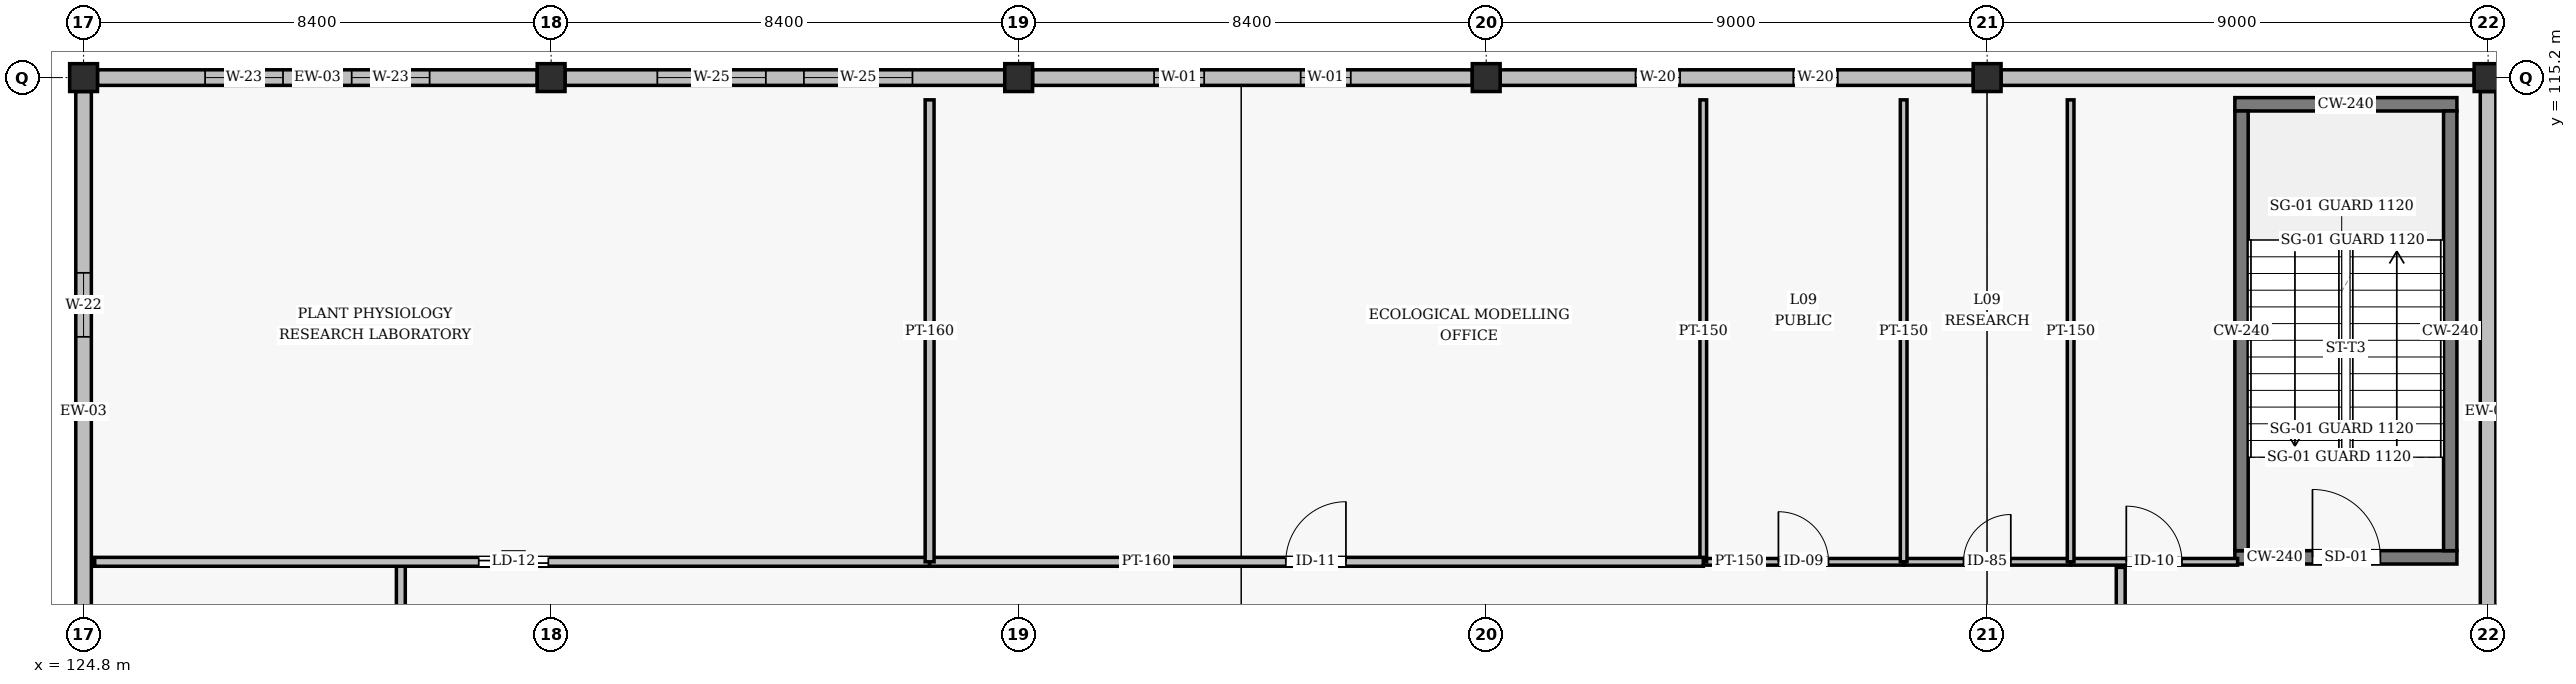
"""IFC4 building model, lengths in metres.
Left out: names, types, materials, properties, quantities, classifications, styles, units other than length and angle.
Written with IfcOpenShell. Run it as: python <this file> out.ifc"""

import sys

from ifc_helpers import new_model, si_unit, direction, frame, frame_2d, origin, origin_2d, place, context, subcontext, project, spatial, rectangle, hollow_rectangle, extrude, element, fill, save


model = new_model("IFC4")
c1 = context("Model", 3, precision=1e-05, world=origin(), true_north=direction((0.0, 1.0)))
c2 = subcontext(c1, "Body", "Model", "MODEL_VIEW")
j1 = project(units=[si_unit("LENGTHUNIT", "METRE"), si_unit("PLANEANGLEUNIT", "RADIAN")], contexts=[c1])
p1 = place(None, origin())
s1 = spatial("IfcSite", under=j1, at=p1, CompositionType="ELEMENT")
p2 = place(p1, origin())
s2 = spatial("IfcBuilding", under=s1, at=p2, CompositionType="ELEMENT")
p3 = place(p2, frame((0.0, 0.0, 35.4)))
s3 = spatial("IfcBuildingStorey", under=s2, at=p3, CompositionType="ELEMENT", Elevation=35.4)
for number, where, z_axis, x_axis in (
    (1, (124.8, 115.2, 0.0), (0.0, 0.0, 1.0), (1.0, 0.0, 0.0)),
    (2, (133.2, 115.2, 0.0), (0.0, 0.0, 1.0), (1.0, 0.0, 0.0)),
    (3, (141.6, 115.2, 0.0), (0.0, 0.0, 1.0), (1.0, 0.0, 0.0)),
    (4, (150.0, 115.2, 0.0), (0.0, 0.0, 1.0), (1.0, 0.0, 0.0)),
    (5, (159.0, 115.2, 0.0), (0.0, 0.0, 1.0), (1.0, 0.0, 0.0)),
    (6, (168.0, 115.2, 0.0), (0.0, 0.0, 1.0), (1.0, 0.0, 0.0)),
):
    element("IfcColumn", number, at=place(p3, frame(where, z_axis=z_axis, x_axis=x_axis)), inside=s3, PredefinedType="COLUMN", context=c2, shape_type="SweptSolid", body=[
        extrude(hollow_rectangle(XDim=0.5, YDim=0.5, WallThickness=0.02, InnerFilletRadius=0.02, OuterFilletRadius=0.04, at=origin_2d()), origin(), (0.0, 0.0, 1.0), 4.2),
    ])
p4 = place(p3, frame((168.0, 103.45, 0.0), z_axis=(0.0, 0.0, 1.0), x_axis=(0.0, 1.0, 0.0)))
e7 = element("IfcWall", 7, at=p4, inside=s3, PredefinedType="SOLIDWALL", context=c2, shape_type="SweptSolid", body=[
    extrude(rectangle(XDim=11.5, YDim=0.28, at=frame_2d((5.75, 0.0))), origin(), (0.0, 0.0, 1.0), 3.156),
])
p5 = place(p3, frame((167.75, 115.2, 0.0), z_axis=(0.0, 0.0, 1.0), x_axis=(-1.0, 0.0, 0.0)))
e8 = element("IfcWall", 8, at=p5, inside=s3, PredefinedType="SOLIDWALL", context=c2, shape_type="SweptSolid", body=[
    extrude(rectangle(XDim=8.5, YDim=0.28, at=frame_2d((4.25, 0.0))), origin(), (0.0, 0.0, 1.0), 3.156),
])
p6 = place(p3, frame((158.75, 115.2, 0.0), z_axis=(0.0, 0.0, 1.0), x_axis=(-1.0, 0.0, 0.0)))
e9 = element("IfcWall", 9, at=p6, inside=s3, PredefinedType="SOLIDWALL", context=c2, shape_type="SweptSolid", body=[
    extrude(rectangle(XDim=8.5, YDim=0.28, at=frame_2d((4.25, 0.0))), origin(), (0.0, 0.0, 1.0), 3.156),
])
p7 = place(p6, frame((2.433, 0.0, 1.25)))
e10 = element("IfcOpeningElement", 10, at=p7, cuts=e9, PredefinedType="OPENING", context=c2, shape_type="SweptSolid", body=[
    extrude(rectangle(XDim=0.8, YDim=1.35, at=frame_2d((0.4, 0.675))), frame((0.0, 0.15, 0.0), z_axis=(0.0, -1.0, 0.0), x_axis=(1.0, 0.0, 0.0)), (0.0, 0.0, 1.0), 0.3),
])
p8 = place(p6, frame((5.267, 0.0, 1.25)))
e11 = element("IfcOpeningElement", 11, at=p8, cuts=e9, PredefinedType="OPENING", context=c2, shape_type="SweptSolid", body=[
    extrude(rectangle(XDim=0.8, YDim=1.35, at=frame_2d((0.4, 0.675))), frame((0.0, 0.15, 0.0), z_axis=(0.0, -1.0, 0.0), x_axis=(1.0, 0.0, 0.0)), (0.0, 0.0, 1.0), 0.3),
])
p9 = place(p3, frame((149.75, 115.2, 0.0), z_axis=(0.0, 0.0, 1.0), x_axis=(-1.0, 0.0, 0.0)))
e12 = element("IfcWall", 12, at=p9, inside=s3, PredefinedType="SOLIDWALL", context=c2, shape_type="SweptSolid", body=[
    extrude(rectangle(XDim=7.9, YDim=0.28, at=frame_2d((3.95, 0.0))), origin(), (0.0, 0.0, 1.0), 3.448),
])
p10 = place(p9, frame((2.183, 0.0, 0.95)))
e13 = element("IfcOpeningElement", 13, at=p10, cuts=e12, PredefinedType="OPENING", context=c2, shape_type="SweptSolid", body=[
    extrude(rectangle(XDim=0.9, YDim=1.8, at=frame_2d((0.45, 0.9))), frame((0.0, 0.15, 0.0), z_axis=(0.0, -1.0, 0.0), x_axis=(1.0, 0.0, 0.0)), (0.0, 0.0, 1.0), 0.3),
])
p11 = place(p9, frame((4.817, 0.0, 0.95)))
e14 = element("IfcOpeningElement", 14, at=p11, cuts=e12, PredefinedType="OPENING", context=c2, shape_type="SweptSolid", body=[
    extrude(rectangle(XDim=0.9, YDim=1.8, at=frame_2d((0.45, 0.9))), frame((0.0, 0.15, 0.0), z_axis=(0.0, -1.0, 0.0), x_axis=(1.0, 0.0, 0.0)), (0.0, 0.0, 1.0), 0.3),
])
p12 = place(p3, frame((141.35, 115.2, 0.0), z_axis=(0.0, 0.0, 1.0), x_axis=(-1.0, 0.0, 0.0)))
e15 = element("IfcWall", 15, at=p12, inside=s3, PredefinedType="SOLIDWALL", context=c2, shape_type="SweptSolid", body=[
    extrude(rectangle(XDim=7.9, YDim=0.28, at=frame_2d((3.95, 0.0))), origin(), (0.0, 0.0, 1.0), 3.448),
])
p13 = place(p12, frame((1.658, 0.0, 0.8)))
e16 = element("IfcOpeningElement", 16, at=p13, cuts=e15, PredefinedType="OPENING", context=c2, shape_type="SweptSolid", body=[
    extrude(rectangle(XDim=1.95, YDim=2.15, at=frame_2d((0.975, 1.075))), frame((0.0, 0.15, 0.0), z_axis=(0.0, -1.0, 0.0), x_axis=(1.0, 0.0, 0.0)), (0.0, 0.0, 1.0), 0.3),
])
p14 = place(p12, frame((4.292, 0.0, 0.8)))
e17 = element("IfcOpeningElement", 17, at=p14, cuts=e15, PredefinedType="OPENING", context=c2, shape_type="SweptSolid", body=[
    extrude(rectangle(XDim=1.95, YDim=2.15, at=frame_2d((0.975, 1.075))), frame((0.0, 0.15, 0.0), z_axis=(0.0, -1.0, 0.0), x_axis=(1.0, 0.0, 0.0)), (0.0, 0.0, 1.0), 0.3),
])
p15 = place(p3, frame((132.95, 115.2, 0.0), z_axis=(0.0, 0.0, 1.0), x_axis=(-1.0, 0.0, 0.0)))
e18 = element("IfcWall", 18, at=p15, inside=s3, PredefinedType="SOLIDWALL", context=c2, shape_type="SweptSolid", body=[
    extrude(rectangle(XDim=7.9, YDim=0.28, at=frame_2d((3.95, 0.0))), origin(), (0.0, 0.0, 1.0), 3.448),
])
p16 = place(p15, frame((1.933, 0.0, 0.85)))
e19 = element("IfcOpeningElement", 19, at=p16, cuts=e18, PredefinedType="OPENING", context=c2, shape_type="SweptSolid", body=[
    extrude(rectangle(XDim=1.4, YDim=2.05, at=frame_2d((0.7, 1.025))), frame((0.0, 0.15, 0.0), z_axis=(0.0, -1.0, 0.0), x_axis=(1.0, 0.0, 0.0)), (0.0, 0.0, 1.0), 0.3),
])
p17 = place(p15, frame((4.567, 0.0, 0.85)))
e20 = element("IfcOpeningElement", 20, at=p17, cuts=e18, PredefinedType="OPENING", context=c2, shape_type="SweptSolid", body=[
    extrude(rectangle(XDim=1.4, YDim=2.05, at=frame_2d((0.7, 1.025))), frame((0.0, 0.15, 0.0), z_axis=(0.0, -1.0, 0.0), x_axis=(1.0, 0.0, 0.0)), (0.0, 0.0, 1.0), 0.3),
])
p18 = place(p3, frame((124.8, 114.95, 0.0), z_axis=(0.0, 0.0, 1.0), x_axis=(0.0, -1.0, 0.0)))
e21 = element("IfcWall", 21, at=p18, inside=s3, PredefinedType="SOLIDWALL", context=c2, shape_type="SweptSolid", body=[
    extrude(rectangle(XDim=11.5, YDim=0.28, at=frame_2d((5.75, 0.0))), origin(), (0.0, 0.0, 1.0), 3.156),
])
p19 = place(p18, frame((3.258, 0.0, 0.9)))
e22 = element("IfcOpeningElement", 22, at=p19, cuts=e21, PredefinedType="OPENING", context=c2, shape_type="SweptSolid", body=[
    extrude(rectangle(XDim=1.15, YDim=1.96, at=frame_2d((0.575, 0.98))), frame((0.0, 0.15, 0.0), z_axis=(0.0, -1.0, 0.0), x_axis=(1.0, 0.0, 0.0)), (0.0, 0.0, 1.0), 0.3),
])
p20 = place(p3, frame((163.45, 106.58, 0.0), z_axis=(0.0, 0.0, 1.0), x_axis=(1.0, 0.0, 0.0)))
e23 = element("IfcWall", 23, at=p20, inside=s3, PredefinedType="SHEAR", context=c2, shape_type="SweptSolid", body=[
    extrude(rectangle(XDim=3.99, YDim=0.24, at=frame_2d((1.995, 0.0))), origin(), (0.0, 0.0, 1.0), 3.948),
])
p21 = place(p20, frame((1.395, 0.0, 0.0)))
e24 = element("IfcOpeningElement", 24, at=p21, cuts=e23, PredefinedType="OPENING", context=c2, shape_type="SweptSolid", body=[
    extrude(rectangle(XDim=1.22, YDim=2.18, at=frame_2d((0.61, 1.09))), frame((0.0, 0.13, 0.0), z_axis=(0.0, -1.0, 0.0), x_axis=(1.0, 0.0, 0.0)), (0.0, 0.0, 1.0), 0.26),
])
p22 = place(p3, frame((163.45, 114.72, 0.0), z_axis=(0.0, 0.0, 1.0), x_axis=(1.0, 0.0, 0.0)))
e25 = element("IfcWall", 25, at=p22, inside=s3, PredefinedType="SHEAR", context=c2, shape_type="SweptSolid", body=[
    extrude(rectangle(XDim=3.99, YDim=0.24, at=frame_2d((1.995, 0.0))), origin(), (0.0, 0.0, 1.0), 3.948),
])
for number, where, z_axis, x_axis in (
    (26, (163.57, 106.7, 0.0), (0.0, 0.0, 1.0), (0.0, 1.0, 0.0)),
    (27, (167.32, 106.7, 0.0), (0.0, 0.0, 1.0), (0.0, 1.0, 0.0)),
):
    element("IfcWall", number, at=place(p3, frame(where, z_axis=z_axis, x_axis=x_axis)), inside=s3, PredefinedType="SHEAR", context=c2, shape_type="SweptSolid", body=[
        extrude(rectangle(XDim=7.9, YDim=0.24, at=frame_2d((3.95, 0.0))), origin(), (0.0, 0.0, 1.0), 3.948),
    ])
p23 = place(p3, frame((153.9, 106.5, 0.0), z_axis=(0.0, 0.0, 1.0), x_axis=(1.0, 0.0, 0.0)))
e28 = element("IfcWall", 28, at=p23, inside=s3, PredefinedType="PARTITIONING", context=c2, shape_type="SweptSolid", body=[
    extrude(rectangle(XDim=3.6, YDim=0.12, at=frame_2d((1.8, 0.0))), origin(), (0.0, 0.0, 1.0), 3.948),
])
p24 = place(p23, frame((1.35, 0.0, 0.0)))
e29 = element("IfcOpeningElement", 29, at=p24, cuts=e28, PredefinedType="OPENING", context=c2, shape_type="SweptSolid", body=[
    extrude(rectangle(XDim=0.9, YDim=2.1, at=frame_2d((0.45, 1.05))), frame((0.0, 0.07, 0.0), z_axis=(0.0, -1.0, 0.0), x_axis=(1.0, 0.0, 0.0)), (0.0, 0.0, 1.0), 0.14),
])
p25 = place(p3, frame((157.5, 106.5, 0.0), z_axis=(0.0, 0.0, 1.0), x_axis=(1.0, 0.0, 0.0)))
e30 = element("IfcWall", 30, at=p25, inside=s3, PredefinedType="PARTITIONING", context=c2, shape_type="SweptSolid", body=[
    extrude(rectangle(XDim=3.0, YDim=0.12, at=frame_2d((1.5, 0.0))), origin(), (0.0, 0.0, 1.0), 3.248),
])
p26 = place(p25, frame((1.075, 0.0, 0.0)))
e31 = element("IfcOpeningElement", 31, at=p26, cuts=e30, PredefinedType="OPENING", context=c2, shape_type="SweptSolid", body=[
    extrude(rectangle(XDim=0.85, YDim=2.1, at=frame_2d((0.425, 1.05))), frame((0.0, 0.07, 0.0), z_axis=(0.0, -1.0, 0.0), x_axis=(1.0, 0.0, 0.0)), (0.0, 0.0, 1.0), 0.14),
])
p27 = place(p3, frame((160.5, 106.5, 0.0), z_axis=(0.0, 0.0, 1.0), x_axis=(1.0, 0.0, 0.0)))
e32 = element("IfcWall", 32, at=p27, inside=s3, PredefinedType="PARTITIONING", context=c2, shape_type="SweptSolid", body=[
    extrude(rectangle(XDim=3.0, YDim=0.12, at=frame_2d((1.5, 0.0))), origin(), (0.0, 0.0, 1.0), 3.948),
])
p28 = place(p27, frame((1.0, 0.0, 0.0)))
e33 = element("IfcOpeningElement", 33, at=p28, cuts=e32, PredefinedType="OPENING", context=c2, shape_type="SweptSolid", body=[
    extrude(rectangle(XDim=1.0, YDim=2.1, at=frame_2d((0.5, 1.05))), frame((0.0, 0.07, 0.0), z_axis=(0.0, -1.0, 0.0), x_axis=(1.0, 0.0, 0.0)), (0.0, 0.0, 1.0), 0.14),
])
for number, where, z_axis, x_axis in (
    (34, (153.9, 106.5, 0.0), (0.0, 0.0, 1.0), (0.0, 1.0, 0.0)),
    (35, (157.5, 106.5, 0.0), (0.0, 0.0, 1.0), (0.0, 1.0, 0.0)),
):
    element("IfcWall", number, at=place(p3, frame(where, z_axis=z_axis, x_axis=x_axis)), inside=s3, PredefinedType="PARTITIONING", context=c2, shape_type="SweptSolid", body=[
        extrude(rectangle(XDim=8.3, YDim=0.12, at=frame_2d((4.15, 0.0))), origin(), (0.0, 0.0, 1.0), 3.552),
    ])
p29 = place(p3, frame((160.5, 106.5, 0.0), z_axis=(0.0, 0.0, 1.0), x_axis=(0.0, 1.0, 0.0)))
e36 = element("IfcWall", 36, at=p29, inside=s3, PredefinedType="PARTITIONING", context=c2, shape_type="SweptSolid", body=[
    extrude(rectangle(XDim=8.3, YDim=0.12, at=frame_2d((4.15, 0.0))), origin(), (0.0, 0.0, 1.0), 3.948),
])
p30 = place(p3, frame((161.4, 92.3, 0.0), z_axis=(0.0, 0.0, 1.0), x_axis=(0.0, 1.0, 0.0)))
e37 = element("IfcWall", 37, at=p30, inside=s3, PredefinedType="PARTITIONING", context=c2, shape_type="SweptSolid", body=[
    extrude(rectangle(XDim=14.1, YDim=0.16, at=frame_2d((7.05, 0.0))), origin(), (0.0, 0.0, 1.0), 3.348),
])
p31 = place(p30, frame((6.5, 0.0, 0.0)))
e38 = element("IfcOpeningElement", 38, at=p31, cuts=e37, PredefinedType="OPENING", context=c2, shape_type="SweptSolid", body=[
    extrude(rectangle(XDim=1.08, YDim=2.08, at=frame_2d((0.54, 1.04))), frame((0.0, 0.09, 0.0), z_axis=(0.0, -1.0, 0.0), x_axis=(1.0, 0.0, 0.0)), (0.0, 0.0, 1.0), 0.18),
])
p32 = place(p3, frame((130.5, 92.3, 0.0), z_axis=(0.0, 0.0, 1.0), x_axis=(0.0, 1.0, 0.0)))
e39 = element("IfcWall", 39, at=p32, inside=s3, PredefinedType="PARTITIONING", context=c2, shape_type="SweptSolid", body=[
    extrude(rectangle(XDim=14.2, YDim=0.16, at=frame_2d((7.1, 0.0))), origin(), (0.0, 0.0, 1.0), 3.452),
])
p33 = place(p32, frame((6.55, 0.0, 0.0)))
e40 = element("IfcOpeningElement", 40, at=p33, cuts=e39, PredefinedType="OPENING", context=c2, shape_type="SweptSolid", body=[
    extrude(rectangle(XDim=1.14, YDim=2.12, at=frame_2d((0.57, 1.06))), frame((0.0, 0.09, 0.0), z_axis=(0.0, -1.0, 0.0), x_axis=(1.0, 0.0, 0.0)), (0.0, 0.0, 1.0), 0.18),
])
p34 = place(p3, frame((125.0, 106.5, 0.0), z_axis=(0.0, 0.0, 1.0), x_axis=(1.0, 0.0, 0.0)))
e41 = element("IfcWall", 41, at=p34, inside=s3, PredefinedType="PARTITIONING", context=c2, shape_type="SweptSolid", body=[
    extrude(rectangle(XDim=15.0, YDim=0.16, at=frame_2d((7.5, 0.0))), origin(), (0.0, 0.0, 1.0), 3.248),
])
p35 = place(p34, frame((6.9, 0.0, 0.0)))
e42 = element("IfcOpeningElement", 42, at=p35, cuts=e41, PredefinedType="OPENING", context=c2, shape_type="SweptSolid", body=[
    extrude(rectangle(XDim=1.25, YDim=2.12, at=frame_2d((0.625, 1.06))), frame((0.0, 0.09, 0.0), z_axis=(0.0, -1.0, 0.0), x_axis=(1.0, 0.0, 0.0)), (0.0, 0.0, 1.0), 0.18),
])
p36 = place(p3, frame((140.0, 106.5, 0.0), z_axis=(0.0, 0.0, 1.0), x_axis=(1.0, 0.0, 0.0)))
e43 = element("IfcWall", 43, at=p36, inside=s3, PredefinedType="PARTITIONING", context=c2, shape_type="SweptSolid", body=[
    extrude(rectangle(XDim=13.9, YDim=0.16, at=frame_2d((6.95, 0.0))), origin(), (0.0, 0.0, 1.0), 3.248),
])
p37 = place(p36, frame((6.4, 0.0, 0.0)))
e44 = element("IfcOpeningElement", 44, at=p37, cuts=e43, PredefinedType="OPENING", context=c2, shape_type="SweptSolid", body=[
    extrude(rectangle(XDim=1.08, YDim=2.08, at=frame_2d((0.54, 1.04))), frame((0.0, 0.09, 0.0), z_axis=(0.0, -1.0, 0.0), x_axis=(1.0, 0.0, 0.0)), (0.0, 0.0, 1.0), 0.18),
])
p38 = place(p3, frame((140.0, 106.5, 0.0), z_axis=(0.0, 0.0, 1.0), x_axis=(0.0, 1.0, 0.0)))
e45 = element("IfcWall", 45, at=p38, inside=s3, PredefinedType="PARTITIONING", context=c2, shape_type="SweptSolid", body=[
    extrude(rectangle(XDim=8.3, YDim=0.16, at=frame_2d((4.15, 0.0))), origin(), (0.0, 0.0, 1.0), 3.602),
])
p39 = place(p7, origin())
e46 = element("IfcWindow", 46, at=p39, inside=s3, PartitioningType="SINGLE_PANEL", PredefinedType="WINDOW", context=c2, shape_type="SweptSolid", body=[
    extrude(rectangle(XDim=0.8, YDim=1.35, at=frame_2d((0.4, 0.675))), frame((0.0, 0.03, 0.0), z_axis=(0.0, -1.0, 0.0), x_axis=(1.0, 0.0, 0.0)), (0.0, 0.0, 1.0), 0.06),
])
fill(e10, e46)
p40 = place(p8, origin())
e47 = element("IfcWindow", 47, at=p40, inside=s3, PartitioningType="SINGLE_PANEL", PredefinedType="WINDOW", context=c2, shape_type="SweptSolid", body=[
    extrude(rectangle(XDim=0.8, YDim=1.35, at=frame_2d((0.4, 0.675))), frame((0.0, 0.03, 0.0), z_axis=(0.0, -1.0, 0.0), x_axis=(1.0, 0.0, 0.0)), (0.0, 0.0, 1.0), 0.06),
])
fill(e11, e47)
p41 = place(p10, origin())
e48 = element("IfcWindow", 48, at=p41, inside=s3, PartitioningType="SINGLE_PANEL", PredefinedType="WINDOW", context=c2, shape_type="SweptSolid", body=[
    extrude(rectangle(XDim=0.9, YDim=1.8, at=frame_2d((0.45, 0.9))), frame((0.0, 0.03, 0.0), z_axis=(0.0, -1.0, 0.0), x_axis=(1.0, 0.0, 0.0)), (0.0, 0.0, 1.0), 0.06),
])
fill(e13, e48)
p42 = place(p11, origin())
e49 = element("IfcWindow", 49, at=p42, inside=s3, PartitioningType="SINGLE_PANEL", PredefinedType="WINDOW", context=c2, shape_type="SweptSolid", body=[
    extrude(rectangle(XDim=0.9, YDim=1.8, at=frame_2d((0.45, 0.9))), frame((0.0, 0.03, 0.0), z_axis=(0.0, -1.0, 0.0), x_axis=(1.0, 0.0, 0.0)), (0.0, 0.0, 1.0), 0.06),
])
fill(e14, e49)
p43 = place(p13, origin())
e50 = element("IfcWindow", 50, at=p43, inside=s3, PartitioningType="SINGLE_PANEL", PredefinedType="WINDOW", context=c2, shape_type="SweptSolid", body=[
    extrude(rectangle(XDim=1.95, YDim=2.15, at=frame_2d((0.975, 1.075))), frame((0.0, 0.03, 0.0), z_axis=(0.0, -1.0, 0.0), x_axis=(1.0, 0.0, 0.0)), (0.0, 0.0, 1.0), 0.06),
])
fill(e16, e50)
p44 = place(p14, origin())
e51 = element("IfcWindow", 51, at=p44, inside=s3, PartitioningType="SINGLE_PANEL", PredefinedType="WINDOW", context=c2, shape_type="SweptSolid", body=[
    extrude(rectangle(XDim=1.95, YDim=2.15, at=frame_2d((0.975, 1.075))), frame((0.0, 0.03, 0.0), z_axis=(0.0, -1.0, 0.0), x_axis=(1.0, 0.0, 0.0)), (0.0, 0.0, 1.0), 0.06),
])
fill(e17, e51)
p45 = place(p16, origin())
e52 = element("IfcWindow", 52, at=p45, inside=s3, PartitioningType="SINGLE_PANEL", PredefinedType="WINDOW", context=c2, shape_type="SweptSolid", body=[
    extrude(rectangle(XDim=1.4, YDim=2.05, at=frame_2d((0.7, 1.025))), frame((0.0, 0.03, 0.0), z_axis=(0.0, -1.0, 0.0), x_axis=(1.0, 0.0, 0.0)), (0.0, 0.0, 1.0), 0.06),
])
fill(e19, e52)
p46 = place(p17, origin())
e53 = element("IfcWindow", 53, at=p46, inside=s3, PartitioningType="SINGLE_PANEL", PredefinedType="WINDOW", context=c2, shape_type="SweptSolid", body=[
    extrude(rectangle(XDim=1.4, YDim=2.05, at=frame_2d((0.7, 1.025))), frame((0.0, 0.03, 0.0), z_axis=(0.0, -1.0, 0.0), x_axis=(1.0, 0.0, 0.0)), (0.0, 0.0, 1.0), 0.06),
])
fill(e20, e53)
p47 = place(p19, origin())
e54 = element("IfcWindow", 54, at=p47, inside=s3, PartitioningType="SINGLE_PANEL", PredefinedType="WINDOW", context=c2, shape_type="SweptSolid", body=[
    extrude(rectangle(XDim=1.15, YDim=1.96, at=frame_2d((0.575, 0.98))), frame((0.0, 0.03, 0.0), z_axis=(0.0, -1.0, 0.0), x_axis=(1.0, 0.0, 0.0)), (0.0, 0.0, 1.0), 0.06),
])
fill(e22, e54)
p48 = place(p21, origin())
e55 = element("IfcDoor", 55, at=p48, inside=s3, OperationType="SINGLE_SWING_LEFT", PredefinedType="DOOR", context=c2, shape_type="SweptSolid", body=[
    extrude(rectangle(XDim=1.22, YDim=2.18, at=frame_2d((0.61, 1.09))), frame((0.0, 0.025, 0.0), z_axis=(0.0, -1.0, 0.0), x_axis=(1.0, 0.0, 0.0)), (0.0, 0.0, 1.0), 0.05),
])
fill(e24, e55)
p49 = place(p24, origin())
e56 = element("IfcDoor", 56, at=p49, inside=s3, OperationType="SINGLE_SWING_LEFT", PredefinedType="DOOR", context=c2, shape_type="SweptSolid", body=[
    extrude(rectangle(XDim=0.9, YDim=2.1, at=frame_2d((0.45, 1.05))), frame((0.0, 0.025, 0.0), z_axis=(0.0, -1.0, 0.0), x_axis=(1.0, 0.0, 0.0)), (0.0, 0.0, 1.0), 0.05),
])
fill(e29, e56)
p50 = place(p26, origin())
e57 = element("IfcDoor", 57, at=p50, inside=s3, OperationType="SINGLE_SWING_RIGHT", PredefinedType="DOOR", context=c2, shape_type="SweptSolid", body=[
    extrude(rectangle(XDim=0.85, YDim=2.1, at=frame_2d((0.425, 1.05))), frame((0.0, 0.025, 0.0), z_axis=(0.0, -1.0, 0.0), x_axis=(1.0, 0.0, 0.0)), (0.0, 0.0, 1.0), 0.05),
])
fill(e31, e57)
p51 = place(p28, origin())
e58 = element("IfcDoor", 58, at=p51, inside=s3, OperationType="SINGLE_SWING_LEFT", PredefinedType="DOOR", context=c2, shape_type="SweptSolid", body=[
    extrude(rectangle(XDim=1.0, YDim=2.1, at=frame_2d((0.5, 1.05))), frame((0.0, 0.025, 0.0), z_axis=(0.0, -1.0, 0.0), x_axis=(1.0, 0.0, 0.0)), (0.0, 0.0, 1.0), 0.05),
])
fill(e33, e58)
p52 = place(p35, origin())
e59 = element("IfcDoor", 59, at=p52, inside=s3, OperationType="SINGLE_SWING_LEFT", PredefinedType="DOOR", context=c2, shape_type="SweptSolid", body=[
    extrude(rectangle(XDim=1.25, YDim=2.12, at=frame_2d((0.625, 1.06))), frame((0.0, 0.025, 0.0), z_axis=(0.0, -1.0, 0.0), x_axis=(1.0, 0.0, 0.0)), (0.0, 0.0, 1.0), 0.05),
])
fill(e42, e59)
p53 = place(p37, origin())
e60 = element("IfcDoor", 60, at=p53, inside=s3, OperationType="SINGLE_SWING_RIGHT", PredefinedType="DOOR", context=c2, shape_type="SweptSolid", body=[
    extrude(rectangle(XDim=1.08, YDim=2.08, at=frame_2d((0.54, 1.04))), frame((0.0, 0.025, 0.0), z_axis=(0.0, -1.0, 0.0), x_axis=(1.0, 0.0, 0.0)), (0.0, 0.0, 1.0), 0.05),
])
fill(e44, e60)
save(model, sys.argv[1])
